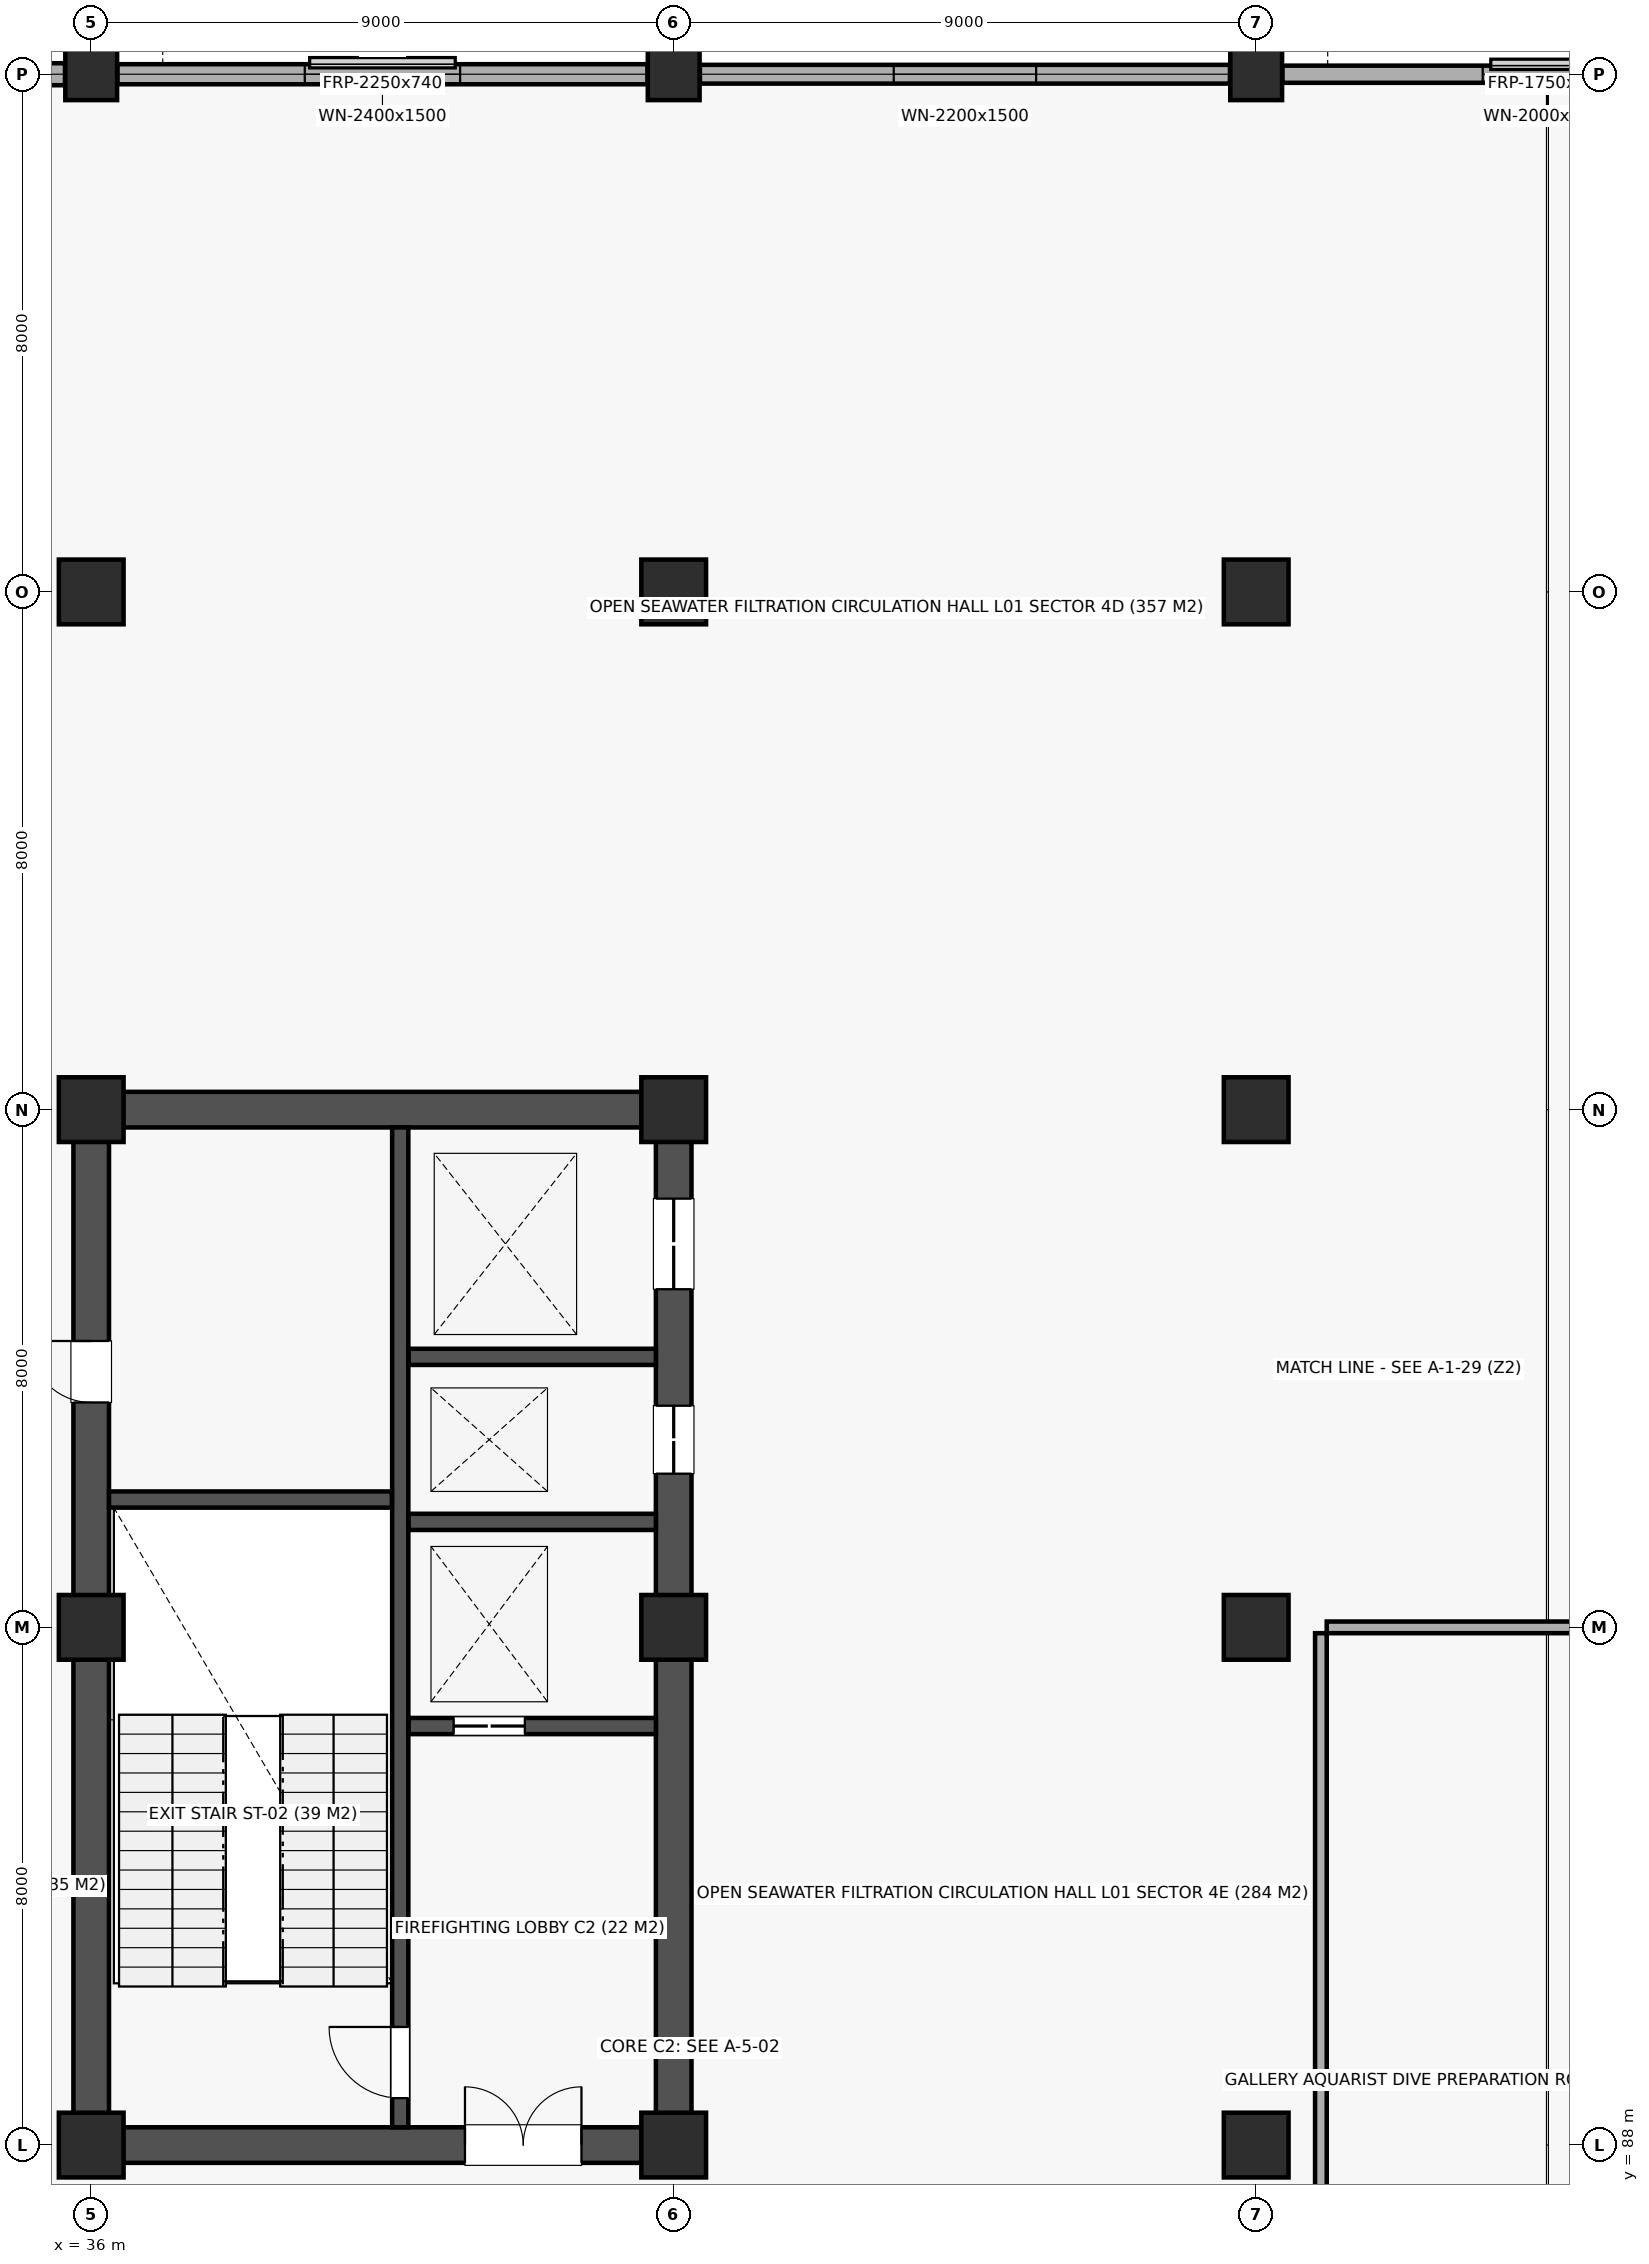
"""IFC4 building model, lengths in metres.
Left out: names, types, materials, properties, quantities, classifications, styles, units other than length and angle.
Written with IfcOpenShell. Run it as: python <this file> out.ifc"""

import sys

from ifc_helpers import new_model, si_unit, direction, frame, frame_2d, origin, origin_2d, place, context, subcontext, project, spatial, rectangle, extrude, element, fill, save


model = new_model("IFC4")
c1 = context("Model", 3, precision=1e-05, world=origin(), true_north=direction((0.0, 1.0)))
c2 = subcontext(c1, "Body", "Model", "MODEL_VIEW")
j1 = project(units=[si_unit("LENGTHUNIT", "METRE"), si_unit("PLANEANGLEUNIT", "RADIAN")], contexts=[c1])
p1 = place(None, origin())
s1 = spatial("IfcSite", under=j1, at=p1, CompositionType="ELEMENT")
p2 = place(p1, origin())
s2 = spatial("IfcBuilding", under=s1, at=p2, CompositionType="ELEMENT")
p3 = place(p2, frame((0.0, 0.0, 4.5)))
s3 = spatial("IfcBuildingStorey", under=s2, at=p3, CompositionType="ELEMENT", Elevation=4.5)
for number, where, z_axis, x_axis in (
    (1, (36.0, 88.0, 0.0), (0.0, 0.0, 1.0), (1.0, 0.0, 0.0)),
    (2, (36.0, 96.0, 0.0), (0.0, 0.0, 1.0), (1.0, 0.0, 0.0)),
    (3, (36.0, 104.0, 0.0), (0.0, 0.0, 1.0), (1.0, 0.0, 0.0)),
    (4, (36.0, 112.0, 0.0), (0.0, 0.0, 1.0), (1.0, 0.0, 0.0)),
):
    element("IfcColumn", number, at=place(p3, frame(where, z_axis=z_axis, x_axis=x_axis)), inside=s3, PredefinedType="COLUMN", context=c2, shape_type="SweptSolid", body=[
        extrude(rectangle(XDim=1.0, YDim=1.0, at=origin_2d()), origin(), (0.0, 0.0, 1.0), 4.5),
    ])
p4 = place(p3, frame((36.0, 120.0, 0.0), z_axis=(0.0, 0.0, 1.0), x_axis=(1.0, 0.0, 0.0)))
e5 = element("IfcColumn", 5, at=p4, inside=s3, PredefinedType="COLUMN", context=c2, shape_type="SweptSolid", body=[
    extrude(rectangle(XDim=0.8, YDim=0.8, at=origin_2d()), origin(), (0.0, 0.0, 1.0), 4.5),
])
for number, where, z_axis, x_axis in (
    (6, (45.0, 88.0, 0.0), (0.0, 0.0, 1.0), (1.0, 0.0, 0.0)),
    (7, (45.0, 96.0, 0.0), (0.0, 0.0, 1.0), (1.0, 0.0, 0.0)),
    (8, (45.0, 104.0, 0.0), (0.0, 0.0, 1.0), (1.0, 0.0, 0.0)),
    (9, (45.0, 112.0, 0.0), (0.0, 0.0, 1.0), (1.0, 0.0, 0.0)),
):
    element("IfcColumn", number, at=place(p3, frame(where, z_axis=z_axis, x_axis=x_axis)), inside=s3, PredefinedType="COLUMN", context=c2, shape_type="SweptSolid", body=[
        extrude(rectangle(XDim=1.0, YDim=1.0, at=origin_2d()), origin(), (0.0, 0.0, 1.0), 4.5),
    ])
p5 = place(p3, frame((45.0, 120.0, 0.0), z_axis=(0.0, 0.0, 1.0), x_axis=(1.0, 0.0, 0.0)))
e10 = element("IfcColumn", 10, at=p5, inside=s3, PredefinedType="COLUMN", context=c2, shape_type="SweptSolid", body=[
    extrude(rectangle(XDim=0.8, YDim=0.8, at=origin_2d()), origin(), (0.0, 0.0, 1.0), 4.5),
])
for number, where, z_axis, x_axis in (
    (11, (54.0, 88.0, 0.0), (0.0, 0.0, 1.0), (1.0, 0.0, 0.0)),
    (12, (54.0, 96.0, 0.0), (0.0, 0.0, 1.0), (1.0, 0.0, 0.0)),
    (13, (54.0, 104.0, 0.0), (0.0, 0.0, 1.0), (1.0, 0.0, 0.0)),
    (14, (54.0, 112.0, 0.0), (0.0, 0.0, 1.0), (1.0, 0.0, 0.0)),
):
    element("IfcColumn", number, at=place(p3, frame(where, z_axis=z_axis, x_axis=x_axis)), inside=s3, PredefinedType="COLUMN", context=c2, shape_type="SweptSolid", body=[
        extrude(rectangle(XDim=1.0, YDim=1.0, at=origin_2d()), origin(), (0.0, 0.0, 1.0), 4.5),
    ])
p6 = place(p3, frame((54.0, 120.0, 0.0), z_axis=(0.0, 0.0, 1.0), x_axis=(1.0, 0.0, 0.0)))
e15 = element("IfcColumn", 15, at=p6, inside=s3, PredefinedType="COLUMN", context=c2, shape_type="SweptSolid", body=[
    extrude(rectangle(XDim=0.8, YDim=0.8, at=origin_2d()), origin(), (0.0, 0.0, 1.0), 4.5),
])
p7 = place(p3, frame((36.275, 88.0, 0.0), z_axis=(0.0, 0.0, 1.0), x_axis=(1.0, 0.0, 0.0)))
e16 = element("IfcWall", 16, at=p7, inside=s3, PredefinedType="SHEAR", context=c2, shape_type="SweptSolid", body=[
    extrude(rectangle(XDim=8.45, YDim=0.55, at=frame_2d((4.225, 0.0))), origin(), (0.0, 0.0, 1.0), 4.18),
])
p8 = place(p7, frame((5.5, 0.0, 0.0)))
e17 = element("IfcOpeningElement", 17, at=p8, cuts=e16, PredefinedType="OPENING", context=c2, shape_type="SweptSolid", body=[
    extrude(rectangle(XDim=1.8, YDim=2.18, at=frame_2d((0.9, 1.09))), frame((0.0, 0.287, 0.0), z_axis=(0.0, -1.0, 0.0), x_axis=(1.0, 0.0, 0.0)), (0.0, 0.0, 1.0), 0.574),
])
p9 = place(p3, frame((36.275, 104.0, 0.0), z_axis=(0.0, 0.0, 1.0), x_axis=(1.0, 0.0, 0.0)))
e18 = element("IfcWall", 18, at=p9, inside=s3, PredefinedType="SHEAR", context=c2, shape_type="SweptSolid", body=[
    extrude(rectangle(XDim=8.45, YDim=0.55, at=frame_2d((4.225, 0.0))), origin(), (0.0, 0.0, 1.0), 4.18),
])
p10 = place(p3, frame((36.0, 88.275, 0.0), z_axis=(0.0, 0.0, 1.0), x_axis=(0.0, 1.0, 0.0)))
e19 = element("IfcWall", 19, at=p10, inside=s3, PredefinedType="SHEAR", context=c2, shape_type="SweptSolid", body=[
    extrude(rectangle(XDim=15.45, YDim=0.55, at=frame_2d((7.725, 0.0))), origin(), (0.0, 0.0, 1.0), 4.18),
])
p11 = place(p10, frame((11.2, 0.0, 0.0)))
e20 = element("IfcOpeningElement", 20, at=p11, cuts=e19, PredefinedType="OPENING", context=c2, shape_type="SweptSolid", body=[
    extrude(rectangle(XDim=0.95, YDim=2.1, at=frame_2d((0.475, 1.05))), frame((0.0, 0.287, 0.0), z_axis=(0.0, -1.0, 0.0), x_axis=(1.0, 0.0, 0.0)), (0.0, 0.0, 1.0), 0.574),
])
p12 = place(p3, frame((45.0, 88.275, 0.0), z_axis=(0.0, 0.0, 1.0), x_axis=(0.0, 1.0, 0.0)))
e21 = element("IfcWall", 21, at=p12, inside=s3, PredefinedType="SHEAR", context=c2, shape_type="SweptSolid", body=[
    extrude(rectangle(XDim=15.45, YDim=0.55, at=frame_2d((7.725, 0.0))), origin(), (0.0, 0.0, 1.0), 4.18),
])
p13 = place(p12, frame((10.1, 0.0, 0.0)))
e22 = element("IfcOpeningElement", 22, at=p13, cuts=e21, PredefinedType="OPENING", context=c2, shape_type="SweptSolid", body=[
    extrude(rectangle(XDim=1.05, YDim=2.12, at=frame_2d((0.525, 1.06))), frame((0.0, 0.287, 0.0), z_axis=(0.0, -1.0, 0.0), x_axis=(1.0, 0.0, 0.0)), (0.0, 0.0, 1.0), 0.574),
])
p14 = place(p12, frame((12.95, 0.0, 0.0)))
e23 = element("IfcOpeningElement", 23, at=p14, cuts=e21, PredefinedType="OPENING", context=c2, shape_type="SweptSolid", body=[
    extrude(rectangle(XDim=1.4, YDim=2.2, at=frame_2d((0.7, 1.1))), frame((0.0, 0.287, 0.0), z_axis=(0.0, -1.0, 0.0), x_axis=(1.0, 0.0, 0.0)), (0.0, 0.0, 1.0), 0.574),
])
p15 = place(p3, frame((40.775, 88.275, 0.0), z_axis=(0.0, 0.0, 1.0), x_axis=(0.0, 1.0, 0.0)))
e24 = element("IfcWall", 24, at=p15, inside=s3, PredefinedType="SOLIDWALL", context=c2, shape_type="SweptSolid", body=[
    extrude(rectangle(XDim=15.45, YDim=0.25, at=frame_2d((7.725, 0.0))), origin(), (0.0, 0.0, 1.0), 4.18),
])
p16 = place(p15, frame((0.45, 0.0, 0.0)))
e25 = element("IfcOpeningElement", 25, at=p16, cuts=e24, PredefinedType="OPENING", context=c2, shape_type="SweptSolid", body=[
    extrude(rectangle(XDim=1.1, YDim=2.15, at=frame_2d((0.55, 1.075))), frame((0.0, 0.137, 0.0), z_axis=(0.0, -1.0, 0.0), x_axis=(1.0, 0.0, 0.0)), (0.0, 0.0, 1.0), 0.274),
])
p17 = place(p3, frame((36.275, 97.975, 0.0), z_axis=(0.0, 0.0, 1.0), x_axis=(1.0, 0.0, 0.0)))
e26 = element("IfcWall", 26, at=p17, inside=s3, PredefinedType="SOLIDWALL", context=c2, shape_type="SweptSolid", body=[
    extrude(rectangle(XDim=4.37, YDim=0.25, at=frame_2d((2.185, 0.0))), origin(), (0.0, 0.0, 1.0), 4.18),
])
p18 = place(p3, frame((40.905, 94.475, 0.0), z_axis=(0.0, 0.0, 1.0), x_axis=(1.0, 0.0, 0.0)))
e27 = element("IfcWall", 27, at=p18, inside=s3, PredefinedType="SOLIDWALL", context=c2, shape_type="SweptSolid", body=[
    extrude(rectangle(XDim=3.82, YDim=0.25, at=frame_2d((1.91, 0.0))), origin(), (0.0, 0.0, 1.0), 4.18),
])
p19 = place(p18, frame((0.695, 0.0, 0.0)))
e28 = element("IfcOpeningElement", 28, at=p19, cuts=e27, PredefinedType="OPENING", context=c2, shape_type="SweptSolid", body=[
    extrude(rectangle(XDim=1.1, YDim=2.12, at=frame_2d((0.55, 1.06))), frame((0.0, 0.137, 0.0), z_axis=(0.0, -1.0, 0.0), x_axis=(1.0, 0.0, 0.0)), (0.0, 0.0, 1.0), 0.274),
])
for number, where, z_axis, x_axis in (
    (29, (40.905, 97.63, 0.0), (0.0, 0.0, 1.0), (1.0, 0.0, 0.0)),
    (30, (40.905, 100.18, 0.0), (0.0, 0.0, 1.0), (1.0, 0.0, 0.0)),
):
    element("IfcWall", number, at=place(p3, frame(where, z_axis=z_axis, x_axis=x_axis)), inside=s3, PredefinedType="SOLIDWALL", context=c2, shape_type="SweptSolid", body=[
        extrude(rectangle(XDim=3.82, YDim=0.25, at=frame_2d((1.91, 0.0))), origin(), (0.0, 0.0, 1.0), 4.18),
    ])
p20 = place(p3, frame((27.405, 120.0, 0.0), z_axis=(0.0, 0.0, 1.0), x_axis=(1.0, 0.0, 0.0)))
e31 = element("IfcWall", 31, at=p20, inside=s3, PredefinedType="STANDARD", context=c2, shape_type="SweptSolid", body=[
    extrude(rectangle(XDim=8.19, YDim=0.34, at=frame_2d((4.095, 0.0))), origin(), (0.0, 0.0, 1.0), 3.46),
])
p21 = place(p20, frame((2.795, 0.0, 0.85)))
e32 = element("IfcOpeningElement", 32, at=p21, cuts=e31, PredefinedType="OPENING", context=c2, shape_type="SweptSolid", body=[
    extrude(rectangle(XDim=2.6, YDim=1.5, at=frame_2d((1.3, 0.75))), frame((0.0, 0.182, 0.0), z_axis=(0.0, -1.0, 0.0), x_axis=(1.0, 0.0, 0.0)), (0.0, 0.0, 1.0), 0.364),
])
p22 = place(p3, frame((36.405, 120.0, 0.0), z_axis=(0.0, 0.0, 1.0), x_axis=(1.0, 0.0, 0.0)))
e33 = element("IfcWall", 33, at=p22, inside=s3, PredefinedType="STANDARD", context=c2, shape_type="SweptSolid", body=[
    extrude(rectangle(XDim=8.19, YDim=0.31, at=frame_2d((4.095, 0.0))), origin(), (0.0, 0.0, 1.0), 3.46),
])
p23 = place(p22, frame((2.895, 0.0, 0.85)))
e34 = element("IfcOpeningElement", 34, at=p23, cuts=e33, PredefinedType="OPENING", context=c2, shape_type="SweptSolid", body=[
    extrude(rectangle(XDim=2.4, YDim=1.5, at=frame_2d((1.2, 0.75))), frame((0.0, 0.167, 0.0), z_axis=(0.0, -1.0, 0.0), x_axis=(1.0, 0.0, 0.0)), (0.0, 0.0, 1.0), 0.334),
])
p24 = place(p3, frame((45.405, 120.0, 0.0), z_axis=(0.0, 0.0, 1.0), x_axis=(1.0, 0.0, 0.0)))
e35 = element("IfcWall", 35, at=p24, inside=s3, PredefinedType="STANDARD", context=c2, shape_type="SweptSolid", body=[
    extrude(rectangle(XDim=8.19, YDim=0.29, at=frame_2d((4.095, 0.0))), origin(), (0.0, 0.0, 1.0), 3.46),
])
p25 = place(p24, frame((2.995, 0.0, 0.85)))
e36 = element("IfcOpeningElement", 36, at=p25, cuts=e35, PredefinedType="OPENING", context=c2, shape_type="SweptSolid", body=[
    extrude(rectangle(XDim=2.2, YDim=1.5, at=frame_2d((1.1, 0.75))), frame((0.0, 0.157, 0.0), z_axis=(0.0, -1.0, 0.0), x_axis=(1.0, 0.0, 0.0)), (0.0, 0.0, 1.0), 0.314),
])
p26 = place(p3, frame((54.405, 120.0, 0.0), z_axis=(0.0, 0.0, 1.0), x_axis=(1.0, 0.0, 0.0)))
e37 = element("IfcWall", 37, at=p26, inside=s3, PredefinedType="STANDARD", context=c2, shape_type="SweptSolid", body=[
    extrude(rectangle(XDim=8.19, YDim=0.265, at=frame_2d((4.095, 0.0))), origin(), (0.0, 0.0, 1.0), 3.46),
])
p27 = place(p26, frame((3.095, 0.0, 0.85)))
e38 = element("IfcOpeningElement", 38, at=p27, cuts=e37, PredefinedType="OPENING", context=c2, shape_type="SweptSolid", body=[
    extrude(rectangle(XDim=2.0, YDim=1.5, at=frame_2d((1.0, 0.75))), frame((0.0, 0.145, 0.0), z_axis=(0.0, -1.0, 0.0), x_axis=(1.0, 0.0, 0.0)), (0.0, 0.0, 1.0), 0.289),
])
p28 = place(p3, frame((55.09, 96.0, 0.0), z_axis=(0.0, 0.0, 1.0), x_axis=(1.0, 0.0, 0.0)))
e39 = element("IfcWall", 39, at=p28, inside=s3, PredefinedType="PARTITIONING", context=c2, shape_type="SweptSolid", body=[
    extrude(rectangle(XDim=15.82, YDim=0.18, at=frame_2d((7.91, 0.0))), origin(), (0.0, 0.0, 1.0), 3.33),
])
p29 = place(p3, frame((55.0, 82.09, 0.0), z_axis=(0.0, 0.0, 1.0), x_axis=(0.0, 1.0, 0.0)))
e40 = element("IfcWall", 40, at=p29, inside=s3, PredefinedType="PARTITIONING", context=c2, shape_type="SweptSolid", body=[
    extrude(rectangle(XDim=13.82, YDim=0.18, at=frame_2d((6.91, 0.0))), origin(), (0.0, 0.0, 1.0), 4.18),
])
p30 = place(p8, origin())
e41 = element("IfcDoor", 41, at=p30, inside=s3, OperationType="DOUBLE_DOOR_SINGLE_SWING", PredefinedType="DOOR", context=c2, shape_type="SweptSolid", body=[
    extrude(rectangle(XDim=1.8, YDim=2.18, at=frame_2d((0.9, 1.09))), frame((0.0, 0.025, 0.0), z_axis=(0.0, -1.0, 0.0), x_axis=(1.0, 0.0, 0.0)), (0.0, 0.0, 1.0), 0.05),
])
fill(e17, e41)
p31 = place(p16, origin())
e42 = element("IfcDoor", 42, at=p31, inside=s3, OperationType="SINGLE_SWING_RIGHT", PredefinedType="DOOR", context=c2, shape_type="SweptSolid", body=[
    extrude(rectangle(XDim=1.1, YDim=2.15, at=frame_2d((0.55, 1.075))), frame((0.0, 0.025, 0.0), z_axis=(0.0, -1.0, 0.0), x_axis=(1.0, 0.0, 0.0)), (0.0, 0.0, 1.0), 0.05),
])
fill(e25, e42)
p32 = place(p11, origin())
e43 = element("IfcDoor", 43, at=p32, inside=s3, OperationType="SINGLE_SWING_RIGHT", PredefinedType="DOOR", context=c2, shape_type="SweptSolid", body=[
    extrude(rectangle(XDim=0.95, YDim=2.1, at=frame_2d((0.475, 1.05))), frame((0.0, 0.025, 0.0), z_axis=(0.0, -1.0, 0.0), x_axis=(1.0, 0.0, 0.0)), (0.0, 0.0, 1.0), 0.05),
])
fill(e20, e43)
p33 = place(p19, origin())
e44 = element("IfcDoor", 44, at=p33, inside=s3, OperationType="DOUBLE_DOOR_SLIDING", PredefinedType="DOOR", context=c2, shape_type="SweptSolid", body=[
    extrude(rectangle(XDim=1.1, YDim=2.12, at=frame_2d((0.55, 1.06))), frame((0.0, 0.025, 0.0), z_axis=(0.0, -1.0, 0.0), x_axis=(1.0, 0.0, 0.0)), (0.0, 0.0, 1.0), 0.05),
])
fill(e28, e44)
p34 = place(p13, origin())
e45 = element("IfcDoor", 45, at=p34, inside=s3, OperationType="DOUBLE_DOOR_SLIDING", PredefinedType="DOOR", context=c2, shape_type="SweptSolid", body=[
    extrude(rectangle(XDim=1.05, YDim=2.12, at=frame_2d((0.525, 1.06))), frame((0.0, 0.025, 0.0), z_axis=(0.0, -1.0, 0.0), x_axis=(1.0, 0.0, 0.0)), (0.0, 0.0, 1.0), 0.05),
])
fill(e22, e45)
p35 = place(p14, origin())
e46 = element("IfcDoor", 46, at=p35, inside=s3, OperationType="DOUBLE_DOOR_SLIDING", PredefinedType="DOOR", context=c2, shape_type="SweptSolid", body=[
    extrude(rectangle(XDim=1.4, YDim=2.2, at=frame_2d((0.7, 1.1))), frame((0.0, 0.025, 0.0), z_axis=(0.0, -1.0, 0.0), x_axis=(1.0, 0.0, 0.0)), (0.0, 0.0, 1.0), 0.05),
])
fill(e23, e46)
p36 = place(p23, origin())
e47 = element("IfcWindow", 47, at=p36, inside=s3, PartitioningType="SINGLE_PANEL", PredefinedType="WINDOW", context=c2, shape_type="SweptSolid", body=[
    extrude(rectangle(XDim=2.4, YDim=1.5, at=frame_2d((1.2, 0.75))), frame((0.0, 0.03, 0.0), z_axis=(0.0, -1.0, 0.0), x_axis=(1.0, 0.0, 0.0)), (0.0, 0.0, 1.0), 0.06),
])
fill(e34, e47)
p37 = place(p25, origin())
e48 = element("IfcWindow", 48, at=p37, inside=s3, PartitioningType="SINGLE_PANEL", PredefinedType="WINDOW", context=c2, shape_type="SweptSolid", body=[
    extrude(rectangle(XDim=2.2, YDim=1.5, at=frame_2d((1.1, 0.75))), frame((0.0, 0.03, 0.0), z_axis=(0.0, -1.0, 0.0), x_axis=(1.0, 0.0, 0.0)), (0.0, 0.0, 1.0), 0.06),
])
fill(e36, e48)
p38 = place(p27, origin())
e49 = element("IfcWindow", 49, at=p38, inside=s3, PartitioningType="SINGLE_PANEL", PredefinedType="WINDOW", context=c2, shape_type="SweptSolid", body=[
    extrude(rectangle(XDim=2.0, YDim=1.5, at=frame_2d((1.0, 0.75))), frame((0.0, 0.03, 0.0), z_axis=(0.0, -1.0, 0.0), x_axis=(1.0, 0.0, 0.0)), (0.0, 0.0, 1.0), 0.06),
])
fill(e38, e49)
save(model, sys.argv[1])
